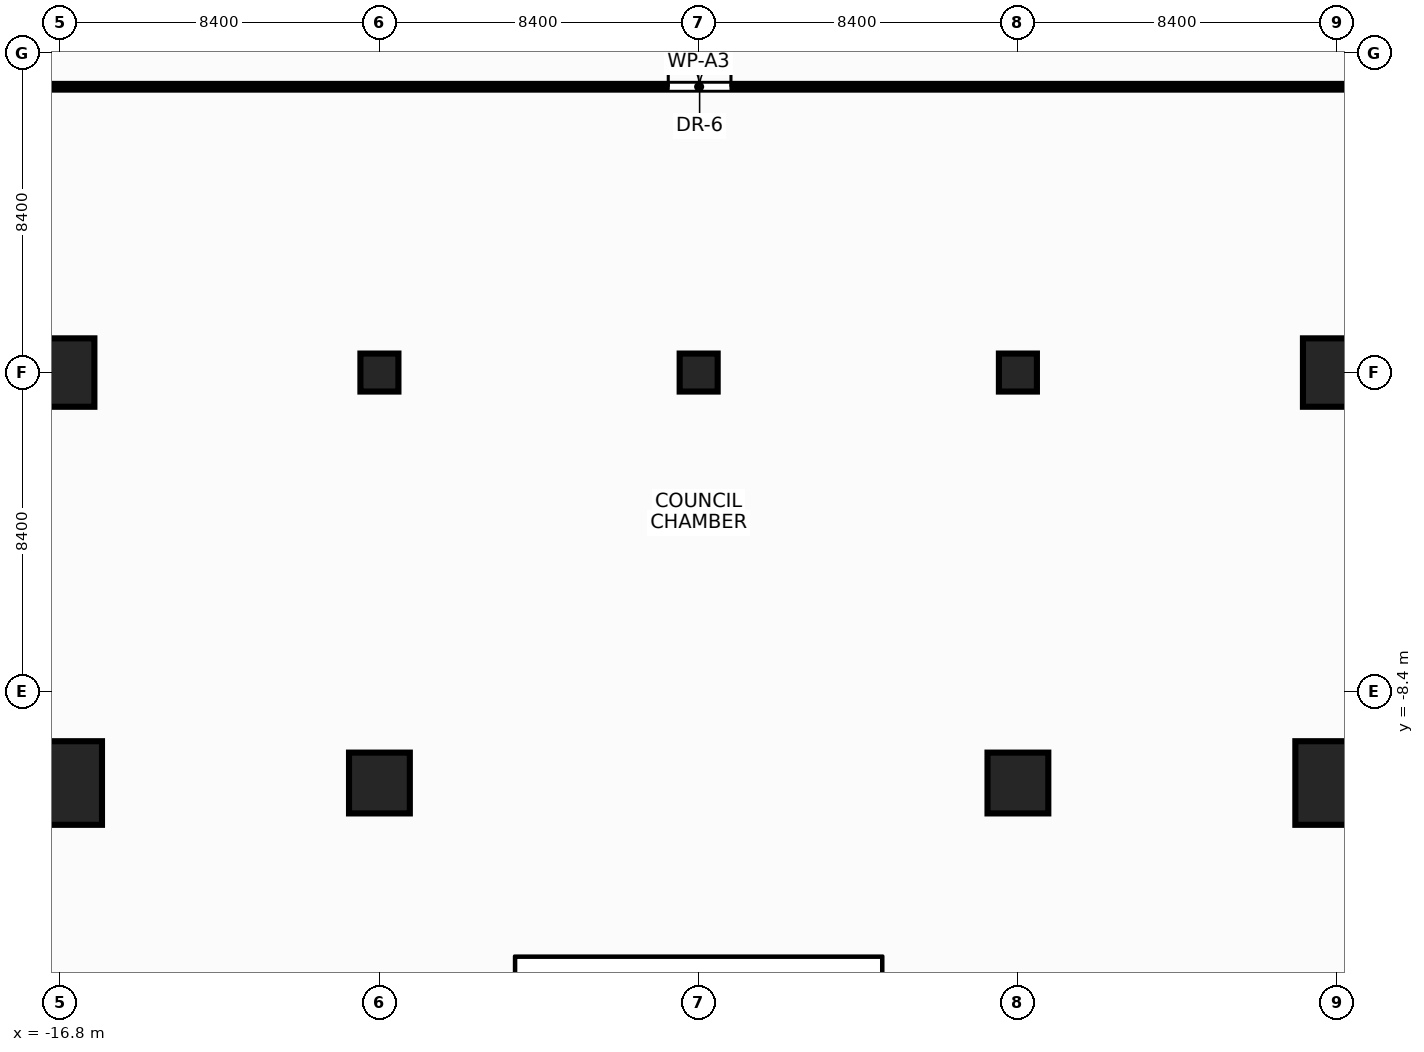
"""IFC4 building model, lengths in metres.
Left out: names, types, materials, properties, quantities, classifications, styles, units other than length and angle.
Written with IfcOpenShell. Run it as: python <this file> out.ifc"""

import sys

from ifc_helpers import new_model, si_unit, direction, frame, frame_2d, origin, origin_with_axes, origin_2d, place, context, subcontext, project, spatial, rectangle, hollow_rectangle, extrude, source, transform, mapped, element, fill, save


model = new_model("IFC4")
c1 = context("Model", 3, precision=1e-05, world=origin(), true_north=direction((0.0, 1.0)))
c2 = subcontext(c1, "Body", "Model", "MODEL_VIEW")
j1 = project(units=[si_unit("LENGTHUNIT", "METRE"), si_unit("PLANEANGLEUNIT", "RADIAN")], contexts=[c1])
p1 = place(None, origin())
s1 = spatial("IfcSite", under=j1, at=p1, CompositionType="ELEMENT")
p2 = place(p1, origin())
s2 = spatial("IfcBuilding", under=s1, at=p2, CompositionType="ELEMENT")
p3 = place(p2, frame((0.0, 0.0, 9.65)))
s3 = spatial("IfcBuildingStorey", under=s2, at=p3, CompositionType="ELEMENT", Elevation=9.65)
m1 = source(origin(), c2, "Body", "SweptSolid", [
    extrude(rectangle(XDim=2.2, YDim=2.2, at=origin_2d()), origin(), (0.0, 0.0, 1.0), 4.65),
])
p4 = place(p3, frame((-16.8, -10.8, 0.0), z_axis=(0.0, 0.0, 1.0), x_axis=(1.0, 0.0, 0.0)))
e1 = element("IfcColumn", 1, at=p4, inside=s3, PredefinedType="COLUMN", context=c2, shape_type="MappedRepresentation", body=[
    mapped(m1, transform((0.0, 0.0, 0.0), x_axis=(1.0, 0.0, 0.0), y_axis=(0.0, 1.0, 0.0), z_axis=(0.0, 0.0, 1.0), scale=1.0)),
])
m2 = source(origin(), c2, "Body", "SweptSolid", [
    extrude(rectangle(XDim=1.8, YDim=1.8, at=origin_2d()), origin(), (0.0, 0.0, 1.0), 4.65),
])
p5 = place(p3, frame((-16.8, 0.0, 0.0), z_axis=(0.0, 0.0, 1.0), x_axis=(1.0, 0.0, 0.0)))
e2 = element("IfcColumn", 2, at=p5, inside=s3, PredefinedType="COLUMN", context=c2, shape_type="MappedRepresentation", body=[
    mapped(m2, transform((0.0, 0.0, 0.0), x_axis=(1.0, 0.0, 0.0), y_axis=(0.0, 1.0, 0.0), z_axis=(0.0, 0.0, 1.0), scale=1.0)),
])
p6 = place(p3, frame((16.8, -10.8, 0.0), z_axis=(0.0, 0.0, 1.0), x_axis=(1.0, 0.0, 0.0)))
e3 = element("IfcColumn", 3, at=p6, inside=s3, PredefinedType="COLUMN", context=c2, shape_type="MappedRepresentation", body=[
    mapped(m1, transform((0.0, 0.0, 0.0), x_axis=(1.0, 0.0, 0.0), y_axis=(0.0, 1.0, 0.0), z_axis=(0.0, 0.0, 1.0), scale=1.0)),
])
p7 = place(p3, frame((16.8, 0.0, 0.0), z_axis=(0.0, 0.0, 1.0), x_axis=(1.0, 0.0, 0.0)))
e4 = element("IfcColumn", 4, at=p7, inside=s3, PredefinedType="COLUMN", context=c2, shape_type="MappedRepresentation", body=[
    mapped(m2, transform((0.0, 0.0, 0.0), x_axis=(1.0, 0.0, 0.0), y_axis=(0.0, 1.0, 0.0), z_axis=(0.0, 0.0, 1.0), scale=1.0)),
])
m3 = source(origin(), c2, "Body", "SweptSolid", [
    extrude(hollow_rectangle(XDim=1.0, YDim=1.0, WallThickness=0.045, at=origin_2d()), origin(), (0.0, 0.0, 1.0), 4.65),
])
p8 = place(p3, frame((-8.4, 0.0, 0.0), z_axis=(0.0, 0.0, 1.0), x_axis=(1.0, 0.0, 0.0)))
e5 = element("IfcColumn", 5, at=p8, inside=s3, PredefinedType="COLUMN", context=c2, shape_type="MappedRepresentation", body=[
    mapped(m3, transform((0.0, 0.0, 0.0), x_axis=(1.0, 0.0, 0.0), y_axis=(0.0, 1.0, 0.0), z_axis=(0.0, 0.0, 1.0), scale=1.0)),
])
m4 = source(origin(), c2, "Body", "SweptSolid", [
    extrude(rectangle(XDim=1.6, YDim=1.6, at=origin_2d()), origin(), (0.0, 0.0, 1.0), 4.65),
])
p9 = place(p3, frame((-8.4, -10.8, 0.0), z_axis=(0.0, 0.0, 1.0), x_axis=(1.0, 0.0, 0.0)))
e6 = element("IfcColumn", 6, at=p9, inside=s3, PredefinedType="COLUMN", context=c2, shape_type="MappedRepresentation", body=[
    mapped(m4, transform((0.0, 0.0, 0.0), x_axis=(1.0, 0.0, 0.0), y_axis=(0.0, 1.0, 0.0), z_axis=(0.0, 0.0, 1.0), scale=1.0)),
])
p10 = place(p3, frame((8.4, 0.0, 0.0), z_axis=(0.0, 0.0, 1.0), x_axis=(1.0, 0.0, 0.0)))
e7 = element("IfcColumn", 7, at=p10, inside=s3, PredefinedType="COLUMN", context=c2, shape_type="MappedRepresentation", body=[
    mapped(m3, transform((0.0, 0.0, 0.0), x_axis=(1.0, 0.0, 0.0), y_axis=(0.0, 1.0, 0.0), z_axis=(0.0, 0.0, 1.0), scale=1.0)),
])
p11 = place(p3, frame((8.4, -10.8, 0.0), z_axis=(0.0, 0.0, 1.0), x_axis=(1.0, 0.0, 0.0)))
e8 = element("IfcColumn", 8, at=p11, inside=s3, PredefinedType="COLUMN", context=c2, shape_type="MappedRepresentation", body=[
    mapped(m4, transform((0.0, 0.0, 0.0), x_axis=(1.0, 0.0, 0.0), y_axis=(0.0, 1.0, 0.0), z_axis=(0.0, 0.0, 1.0), scale=1.0)),
])
m5 = source(origin(), c2, "Body", "SweptSolid", [
    extrude(rectangle(XDim=1.0, YDim=1.0, at=origin_2d()), origin(), (0.0, 0.0, 1.0), 4.65),
])
p12 = place(p3, origin_with_axes())
e9 = element("IfcColumn", 9, at=p12, inside=s3, PredefinedType="COLUMN", context=c2, shape_type="MappedRepresentation", body=[
    mapped(m5, transform((0.0, 0.0, 0.0), x_axis=(1.0, 0.0, 0.0), y_axis=(0.0, 1.0, 0.0), z_axis=(0.0, 0.0, 1.0), scale=1.0)),
])
m6 = source(origin(), c2, "Body", "SweptSolid", [
    extrude(rectangle(XDim=69.0, YDim=0.15, at=frame_2d((34.5, 0.0))), origin(), (0.0, 0.0, 1.0), 3.755),
])
p13 = place(p3, frame((-34.5, 7.52, 0.0), z_axis=(0.0, 0.0, 1.0), x_axis=(1.0, 0.0, 0.0)))
e10 = element("IfcWall", 10, at=p13, inside=s3, PredefinedType="PARTITIONING", context=c2, shape_type="MappedRepresentation", body=[
    mapped(m6, transform((0.0, 0.0, 0.0), x_axis=(1.0, 0.0, 0.0), y_axis=(0.0, 1.0, 0.0), z_axis=(0.0, 0.0, 1.0), scale=1.0)),
])
p14 = place(p13, frame((4.2, 0.0, 0.0)))
e11 = element("IfcOpeningElement", 11, at=p14, cuts=e10, PredefinedType="OPENING", context=c2, shape_type="SweptSolid", body=[
    extrude(rectangle(XDim=1.04, YDim=2.2, at=frame_2d((0.52, 1.1))), frame((0.0, 0.087, 0.0), z_axis=(0.0, -1.0, 0.0), x_axis=(1.0, 0.0, 0.0)), (0.0, 0.0, 1.0), 0.174),
])
p15 = place(p13, frame((33.7, 0.0, 0.0)))
e12 = element("IfcOpeningElement", 12, at=p15, cuts=e10, PredefinedType="OPENING", context=c2, shape_type="SweptSolid", body=[
    extrude(rectangle(XDim=1.65, YDim=2.35, at=frame_2d((0.825, 1.175))), frame((0.0, 0.087, 0.0), z_axis=(0.0, -1.0, 0.0), x_axis=(1.0, 0.0, 0.0)), (0.0, 0.0, 1.0), 0.174),
])
p16 = place(p13, frame((63.7, 0.0, 0.0)))
e13 = element("IfcOpeningElement", 13, at=p16, cuts=e10, PredefinedType="OPENING", context=c2, shape_type="SweptSolid", body=[
    extrude(rectangle(XDim=1.04, YDim=2.2, at=frame_2d((0.52, 1.1))), frame((0.0, 0.087, 0.0), z_axis=(0.0, -1.0, 0.0), x_axis=(1.0, 0.0, 0.0)), (0.0, 0.0, 1.0), 0.174),
])
m7 = source(origin(), c2, "Body", "SweptSolid", [
    extrude(rectangle(XDim=1.65, YDim=2.35, at=frame_2d((0.825, 1.175))), frame((0.0, 0.025, 0.0), z_axis=(0.0, -1.0, 0.0), x_axis=(1.0, 0.0, 0.0)), (0.0, 0.0, 1.0), 0.05),
])
p17 = place(p15, origin())
e14 = element("IfcDoor", 14, at=p17, inside=s3, OperationType="DOUBLE_DOOR_SINGLE_SWING", PredefinedType="DOOR", context=c2, shape_type="MappedRepresentation", body=[
    mapped(m7, transform((0.0, 0.0, 0.0), x_axis=(1.0, 0.0, 0.0), y_axis=(0.0, 1.0, 0.0), z_axis=(0.0, 0.0, 1.0), scale=1.0)),
])
fill(e12, e14)
save(model, sys.argv[1])
